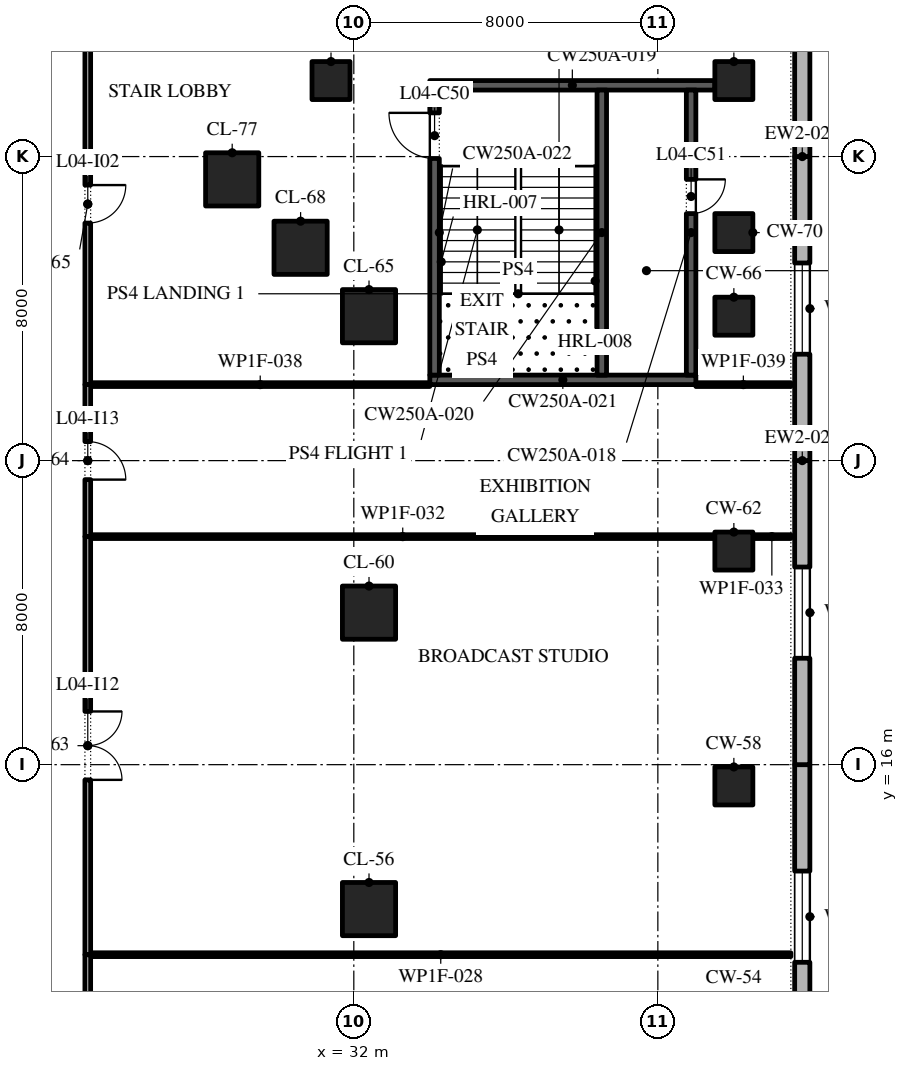
"""IFC4 building model, lengths in metres.
Left out: names, types, materials, properties, quantities, classifications, styles, units other than length and angle.
Written with IfcOpenShell. Run it as: python <this file> out.ifc"""

import sys

from ifc_helpers import new_model, si_unit, direction, frame, frame_2d, origin, origin_2d, place, context, subcontext, project, spatial, polyline, rectangle, outline, extrude, element, fill, save


model = new_model("IFC4")
c1 = context("Model", 3, precision=1e-05, world=origin(), true_north=direction((0.0, 1.0)))
c2 = subcontext(c1, "Body", "Model", "MODEL_VIEW")
j1 = project(units=[si_unit("LENGTHUNIT", "METRE"), si_unit("PLANEANGLEUNIT", "RADIAN")], contexts=[c1])
p1 = place(None, origin())
s1 = spatial("IfcSite", under=j1, at=p1, CompositionType="ELEMENT")
p2 = place(p1, origin())
s2 = spatial("IfcBuilding", under=s1, at=p2, CompositionType="ELEMENT")
p3 = place(p2, frame((0.0, 0.0, 24.0)))
s3 = spatial("IfcBuildingStorey", under=s2, at=p3, CompositionType="ELEMENT", Elevation=24.0)
p4 = place(p3, frame((32.4, 12.2, 0.0), z_axis=(0.0, 0.0, 1.0), x_axis=(1.0, 0.0, 0.0)))
e1 = element("IfcColumn", 1, at=p4, inside=s3, PredefinedType="COLUMN", context=c2, shape_type="SweptSolid", body=[
    extrude(rectangle(XDim=1.4, YDim=1.4, at=origin_2d()), origin(), (0.0, 0.0, 1.0), 4.8),
])
p5 = place(p3, frame((42.0, 15.44, 0.0), z_axis=(0.0, 0.0, 1.0), x_axis=(1.0, 0.0, 0.0)))
e2 = element("IfcColumn", 2, at=p5, inside=s3, PredefinedType="COLUMN", context=c2, shape_type="SweptSolid", body=[
    extrude(rectangle(XDim=1.0, YDim=1.0, at=origin_2d()), origin(), (0.0, 0.0, 1.0), 4.8),
])
p6 = place(p3, frame((32.4, 20.0, 0.0), z_axis=(0.0, 0.0, 1.0), x_axis=(1.0, 0.0, 0.0)))
e3 = element("IfcColumn", 3, at=p6, inside=s3, PredefinedType="COLUMN", context=c2, shape_type="SweptSolid", body=[
    extrude(rectangle(XDim=1.4, YDim=1.4, at=origin_2d()), origin(), (0.0, 0.0, 1.0), 4.8),
])
p7 = place(p3, frame((42.0, 21.62, 0.0), z_axis=(0.0, 0.0, 1.0), x_axis=(1.0, 0.0, 0.0)))
e4 = element("IfcColumn", 4, at=p7, inside=s3, PredefinedType="COLUMN", context=c2, shape_type="SweptSolid", body=[
    extrude(rectangle(XDim=1.0, YDim=1.0, at=origin_2d()), origin(), (0.0, 0.0, 1.0), 4.8),
])
p8 = place(p3, frame((32.4, 27.8, 0.0), z_axis=(0.0, 0.0, 1.0), x_axis=(1.0, 0.0, 0.0)))
e5 = element("IfcColumn", 5, at=p8, inside=s3, PredefinedType="COLUMN", context=c2, shape_type="SweptSolid", body=[
    extrude(rectangle(XDim=1.4, YDim=1.4, at=origin_2d()), origin(), (0.0, 0.0, 1.0), 4.8),
])
p9 = place(p3, frame((42.0, 27.8, 0.0), z_axis=(0.0, 0.0, 1.0), x_axis=(1.0, 0.0, 0.0)))
e6 = element("IfcColumn", 6, at=p9, inside=s3, PredefinedType="COLUMN", context=c2, shape_type="SweptSolid", body=[
    extrude(rectangle(XDim=1.0, YDim=1.0, at=origin_2d()), origin(), (0.0, 0.0, 1.0), 4.8),
])
p10 = place(p3, frame((30.6, 29.6, 0.0), z_axis=(0.0, 0.0, 1.0), x_axis=(1.0, 0.0, 0.0)))
e7 = element("IfcColumn", 7, at=p10, inside=s3, PredefinedType="COLUMN", context=c2, shape_type="SweptSolid", body=[
    extrude(rectangle(XDim=1.4, YDim=1.4, at=origin_2d()), origin(), (0.0, 0.0, 1.0), 4.8),
])
p11 = place(p3, frame((42.0, 30.0, 0.0), z_axis=(0.0, 0.0, 1.0), x_axis=(1.0, 0.0, 0.0)))
e8 = element("IfcColumn", 8, at=p11, inside=s3, PredefinedType="COLUMN", context=c2, shape_type="SweptSolid", body=[
    extrude(rectangle(XDim=1.0, YDim=1.0, at=origin_2d()), origin(), (0.0, 0.0, 1.0), 4.8),
])
p12 = place(p3, frame((28.8, 31.4, 0.0), z_axis=(0.0, 0.0, 1.0), x_axis=(1.0, 0.0, 0.0)))
e9 = element("IfcColumn", 9, at=p12, inside=s3, PredefinedType="COLUMN", context=c2, shape_type="SweptSolid", body=[
    extrude(rectangle(XDim=1.4, YDim=1.4, at=origin_2d()), origin(), (0.0, 0.0, 1.0), 4.8),
])
for number, where, z_axis, x_axis in (
    (10, (31.4, 34.0, 0.0), (0.0, 0.0, 1.0), (1.0, 0.0, 0.0)),
    (11, (42.0, 34.0, 0.0), (0.0, 0.0, 1.0), (1.0, 0.0, 0.0)),
):
    element("IfcColumn", number, at=place(p3, frame(where, z_axis=z_axis, x_axis=x_axis)), inside=s3, PredefinedType="COLUMN", context=c2, shape_type="SweptSolid", body=[
        extrude(rectangle(XDim=1.0, YDim=1.0, at=origin_2d()), origin(), (0.0, 0.0, 1.0), 4.8),
    ])
p13 = place(p3, frame((43.8, 8.0, 0.0), z_axis=(0.0, 0.0, 1.0), x_axis=(0.0, 1.0, 0.0)))
e12 = element("IfcWall", 12, at=p13, inside=s3, PredefinedType="STANDARD", context=c2, shape_type="SweptSolid", body=[
    extrude(rectangle(XDim=8.0, YDim=0.4, at=frame_2d((4.0, 0.0))), origin(), (0.0, 0.0, 1.0), 4.5),
])
p14 = place(p13, frame((2.8, 0.0, 0.9)))
e13 = element("IfcOpeningElement", 13, at=p14, cuts=e12, PredefinedType="OPENING", context=c2, shape_type="SweptSolid", body=[
    extrude(outline(polyline([(0.0, 0.0), (2.4, 0.0), (2.4, 1.5), (2.378, 1.758), (2.313, 2.009), (2.207, 2.245), (2.063, 2.46), (1.885, 2.648), (1.677, 2.804), (1.447, 2.922), (1.2, 3.0), (0.953, 2.922), (0.722, 2.804), (0.515, 2.648), (0.337, 2.46), (0.193, 2.245), (0.087, 2.009), (0.022, 1.758), (0.0, 1.5), (0.0, 0.0)])), frame((0.0, 0.21, 0.0), z_axis=(0.0, -1.0, 0.0), x_axis=(1.0, 0.0, 0.0)), (0.0, 0.0, 1.0), 0.42),
])
p15 = place(p3, frame((43.8, 16.0, 0.0), z_axis=(0.0, 0.0, 1.0), x_axis=(0.0, 1.0, 0.0)))
e14 = element("IfcWall", 14, at=p15, inside=s3, PredefinedType="STANDARD", context=c2, shape_type="SweptSolid", body=[
    extrude(rectangle(XDim=8.0, YDim=0.4, at=frame_2d((4.0, 0.0))), origin(), (0.0, 0.0, 1.0), 4.5),
])
p16 = place(p15, frame((2.8, 0.0, 0.9)))
e15 = element("IfcOpeningElement", 15, at=p16, cuts=e14, PredefinedType="OPENING", context=c2, shape_type="SweptSolid", body=[
    extrude(outline(polyline([(0.0, 0.0), (2.4, 0.0), (2.4, 1.5), (2.378, 1.758), (2.313, 2.009), (2.207, 2.245), (2.063, 2.46), (1.885, 2.648), (1.677, 2.804), (1.447, 2.922), (1.2, 3.0), (0.953, 2.922), (0.722, 2.804), (0.515, 2.648), (0.337, 2.46), (0.193, 2.245), (0.087, 2.009), (0.022, 1.758), (0.0, 1.5), (0.0, 0.0)])), frame((0.0, 0.21, 0.0), z_axis=(0.0, -1.0, 0.0), x_axis=(1.0, 0.0, 0.0)), (0.0, 0.0, 1.0), 0.42),
])
p17 = place(p3, frame((43.8, 24.0, 0.0), z_axis=(0.0, 0.0, 1.0), x_axis=(0.0, 1.0, 0.0)))
e16 = element("IfcWall", 16, at=p17, inside=s3, PredefinedType="STANDARD", context=c2, shape_type="SweptSolid", body=[
    extrude(rectangle(XDim=8.0, YDim=0.4, at=frame_2d((4.0, 0.0))), origin(), (0.0, 0.0, 1.0), 4.5),
])
p18 = place(p17, frame((2.8, 0.0, 0.9)))
e17 = element("IfcOpeningElement", 17, at=p18, cuts=e16, PredefinedType="OPENING", context=c2, shape_type="SweptSolid", body=[
    extrude(outline(polyline([(0.0, 0.0), (2.4, 0.0), (2.4, 1.5), (2.378, 1.758), (2.313, 2.009), (2.207, 2.245), (2.063, 2.46), (1.885, 2.648), (1.677, 2.804), (1.447, 2.922), (1.2, 3.0), (0.953, 2.922), (0.722, 2.804), (0.515, 2.648), (0.337, 2.46), (0.193, 2.245), (0.087, 2.009), (0.022, 1.758), (0.0, 1.5), (0.0, 0.0)])), frame((0.0, 0.21, 0.0), z_axis=(0.0, -1.0, 0.0), x_axis=(1.0, 0.0, 0.0)), (0.0, 0.0, 1.0), 0.42),
])
p19 = place(p3, frame((43.8, 32.0, 0.0), z_axis=(0.0, 0.0, 1.0), x_axis=(0.0, 1.0, 0.0)))
e18 = element("IfcWall", 18, at=p19, inside=s3, PredefinedType="STANDARD", context=c2, shape_type="SweptSolid", body=[
    extrude(rectangle(XDim=4.0, YDim=0.4, at=frame_2d((2.0, 0.0))), origin(), (0.0, 0.0, 1.0), 4.5),
])
p20 = place(p3, frame((34.0, 26.125, 0.0), z_axis=(0.0, 0.0, 1.0), x_axis=(1.0, 0.0, 0.0)))
e19 = element("IfcWall", 19, at=p20, inside=s3, PredefinedType="SHEAR", context=c2, shape_type="SweptSolid", body=[
    extrude(rectangle(XDim=7.0, YDim=0.25, at=frame_2d((3.5, 0.0))), origin(), (0.0, 0.0, 1.0), 4.5),
])
p21 = place(p3, frame((34.0, 33.875, 0.0), z_axis=(0.0, 0.0, 1.0), x_axis=(1.0, 0.0, 0.0)))
e20 = element("IfcWall", 20, at=p21, inside=s3, PredefinedType="SHEAR", context=c2, shape_type="SweptSolid", body=[
    extrude(rectangle(XDim=7.5, YDim=0.25, at=frame_2d((3.75, 0.0))), origin(), (0.0, 0.0, 1.0), 4.5),
])
p22 = place(p3, frame((34.125, 26.25, 0.0), z_axis=(0.0, 0.0, 1.0), x_axis=(0.0, 1.0, 0.0)))
e21 = element("IfcWall", 21, at=p22, inside=s3, PredefinedType="SHEAR", context=c2, shape_type="SweptSolid", body=[
    extrude(rectangle(XDim=7.5, YDim=0.25, at=frame_2d((3.75, 0.0))), origin(), (0.0, 0.0, 1.0), 4.5),
])
p23 = place(p22, frame((5.7, 0.0, 0.0)))
e22 = element("IfcOpeningElement", 22, at=p23, cuts=e21, PredefinedType="OPENING", context=c2, shape_type="SweptSolid", body=[
    extrude(rectangle(XDim=1.2, YDim=2.1, at=frame_2d((0.6, 1.05))), frame((0.0, 0.135, 0.0), z_axis=(0.0, -1.0, 0.0), x_axis=(1.0, 0.0, 0.0)), (0.0, 0.0, 1.0), 0.27),
])
p24 = place(p3, frame((40.875, 26.25, 0.0), z_axis=(0.0, 0.0, 1.0), x_axis=(0.0, 1.0, 0.0)))
e23 = element("IfcWall", 23, at=p24, inside=s3, PredefinedType="SHEAR", context=c2, shape_type="SweptSolid", body=[
    extrude(rectangle(XDim=7.5, YDim=0.25, at=frame_2d((3.75, 0.0))), origin(), (0.0, 0.0, 1.0), 4.5),
])
p25 = place(p24, frame((4.25, 0.0, 0.0)))
e24 = element("IfcOpeningElement", 24, at=p25, cuts=e23, PredefinedType="OPENING", context=c2, shape_type="SweptSolid", body=[
    extrude(rectangle(XDim=0.9, YDim=2.1, at=frame_2d((0.45, 1.05))), frame((0.0, 0.135, 0.0), z_axis=(0.0, -1.0, 0.0), x_axis=(1.0, 0.0, 0.0)), (0.0, 0.0, 1.0), 0.27),
])
p26 = place(p3, frame((38.525, 26.25, 0.0), z_axis=(0.0, 0.0, 1.0), x_axis=(0.0, 1.0, 0.0)))
e25 = element("IfcWall", 25, at=p26, inside=s3, PredefinedType="SHEAR", context=c2, shape_type="SweptSolid", body=[
    extrude(rectangle(XDim=7.5, YDim=0.25, at=frame_2d((3.75, 0.0))), origin(), (0.0, 0.0, 1.0), 4.5),
])
p27 = place(p3, frame((25.075, 11.0, 0.0), z_axis=(0.0, 0.0, 1.0), x_axis=(1.0, 0.0, 0.0)))
e26 = element("IfcWall", 26, at=p27, inside=s3, PredefinedType="PARTITIONING", context=c2, shape_type="SweptSolid", body=[
    extrude(rectangle(XDim=18.425, YDim=0.1, at=frame_2d((9.212, 0.0))), origin(), (0.0, 0.0, 1.0), 4.5),
])
p28 = place(p3, frame((25.075, 22.0, 0.0), z_axis=(0.0, 0.0, 1.0), x_axis=(1.0, 0.0, 0.0)))
e27 = element("IfcWall", 27, at=p28, inside=s3, PredefinedType="PARTITIONING", context=c2, shape_type="SweptSolid", body=[
    extrude(rectangle(XDim=16.425, YDim=0.1, at=frame_2d((8.212, 0.0))), origin(), (0.0, 0.0, 1.0), 4.5),
])
p29 = place(p3, frame((42.5, 22.0, 0.0), z_axis=(0.0, 0.0, 1.0), x_axis=(1.0, 0.0, 0.0)))
e28 = element("IfcWall", 28, at=p29, inside=s3, PredefinedType="PARTITIONING", context=c2, shape_type="SweptSolid", body=[
    extrude(rectangle(XDim=1.0, YDim=0.1, at=frame_2d((0.5, 0.0))), origin(), (0.0, 0.0, 1.0), 4.5),
])
p30 = place(p3, frame((25.075, 26.0, 0.0), z_axis=(0.0, 0.0, 1.0), x_axis=(1.0, 0.0, 0.0)))
e29 = element("IfcWall", 29, at=p30, inside=s3, PredefinedType="PARTITIONING", context=c2, shape_type="SweptSolid", body=[
    extrude(rectangle(XDim=8.925, YDim=0.1, at=frame_2d((4.462, 0.0))), origin(), (0.0, 0.0, 1.0), 4.5),
])
p31 = place(p3, frame((41.0, 26.0, 0.0), z_axis=(0.0, 0.0, 1.0), x_axis=(1.0, 0.0, 0.0)))
e30 = element("IfcWall", 30, at=p31, inside=s3, PredefinedType="PARTITIONING", context=c2, shape_type="SweptSolid", body=[
    extrude(rectangle(XDim=2.5, YDim=0.1, at=frame_2d((1.25, 0.0))), origin(), (0.0, 0.0, 1.0), 4.5),
])
p32 = place(p3, frame((25.0, 0.5, 0.0), z_axis=(0.0, 0.0, 1.0), x_axis=(0.0, 1.0, 0.0)))
e31 = element("IfcWall", 31, at=p32, inside=s3, PredefinedType="PARTITIONING", context=c2, shape_type="SweptSolid", body=[
    extrude(rectangle(XDim=10.5, YDim=0.15, at=frame_2d((5.25, 0.0))), origin(), (0.0, 0.0, 1.0), 4.5),
])
p33 = place(p32, frame((4.35, 0.0, 0.0)))
e32 = element("IfcOpeningElement", 32, at=p33, cuts=e31, PredefinedType="OPENING", context=c2, shape_type="SweptSolid", body=[
    extrude(rectangle(XDim=1.8, YDim=2.1, at=frame_2d((0.9, 1.05))), frame((0.0, 0.085, 0.0), z_axis=(0.0, -1.0, 0.0), x_axis=(1.0, 0.0, 0.0)), (0.0, 0.0, 1.0), 0.17),
])
p34 = place(p3, frame((25.0, 11.0, 0.0), z_axis=(0.0, 0.0, 1.0), x_axis=(0.0, 1.0, 0.0)))
e33 = element("IfcWall", 33, at=p34, inside=s3, PredefinedType="PARTITIONING", context=c2, shape_type="SweptSolid", body=[
    extrude(rectangle(XDim=11.0, YDim=0.15, at=frame_2d((5.5, 0.0))), origin(), (0.0, 0.0, 1.0), 4.5),
])
p35 = place(p34, frame((4.6, 0.0, 0.0)))
e34 = element("IfcOpeningElement", 34, at=p35, cuts=e33, PredefinedType="OPENING", context=c2, shape_type="SweptSolid", body=[
    extrude(rectangle(XDim=1.8, YDim=2.1, at=frame_2d((0.9, 1.05))), frame((0.0, 0.085, 0.0), z_axis=(0.0, -1.0, 0.0), x_axis=(1.0, 0.0, 0.0)), (0.0, 0.0, 1.0), 0.17),
])
p36 = place(p3, frame((25.0, 22.0, 0.0), z_axis=(0.0, 0.0, 1.0), x_axis=(0.0, 1.0, 0.0)))
e35 = element("IfcWall", 35, at=p36, inside=s3, PredefinedType="PARTITIONING", context=c2, shape_type="SweptSolid", body=[
    extrude(rectangle(XDim=4.0, YDim=0.15, at=frame_2d((2.0, 0.0))), origin(), (0.0, 0.0, 1.0), 4.5),
])
p37 = place(p36, frame((1.5, 0.0, 0.0)))
e36 = element("IfcOpeningElement", 36, at=p37, cuts=e35, PredefinedType="OPENING", context=c2, shape_type="SweptSolid", body=[
    extrude(rectangle(XDim=1.0, YDim=2.1, at=frame_2d((0.5, 1.05))), frame((0.0, 0.085, 0.0), z_axis=(0.0, -1.0, 0.0), x_axis=(1.0, 0.0, 0.0)), (0.0, 0.0, 1.0), 0.17),
])
p38 = place(p3, frame((25.0, 26.0, 0.0), z_axis=(0.0, 0.0, 1.0), x_axis=(0.0, 1.0, 0.0)))
e37 = element("IfcWall", 37, at=p38, inside=s3, PredefinedType="PARTITIONING", context=c2, shape_type="SweptSolid", body=[
    extrude(rectangle(XDim=9.5, YDim=0.15, at=frame_2d((4.75, 0.0))), origin(), (0.0, 0.0, 1.0), 4.5),
])
p39 = place(p38, frame((4.25, 0.0, 0.0)))
e38 = element("IfcOpeningElement", 38, at=p39, cuts=e37, PredefinedType="OPENING", context=c2, shape_type="SweptSolid", body=[
    extrude(rectangle(XDim=1.0, YDim=2.1, at=frame_2d((0.5, 1.05))), frame((0.0, 0.085, 0.0), z_axis=(0.0, -1.0, 0.0), x_axis=(1.0, 0.0, 0.0)), (0.0, 0.0, 1.0), 0.17),
])
p40 = place(p14, origin())
e39 = element("IfcWindow", 39, at=p40, inside=s3, PartitioningType="DOUBLE_PANEL_VERTICAL", PredefinedType="WINDOW", context=c2, shape_type="SweptSolid", body=[
    extrude(outline(polyline([(0.0, 0.0), (2.4, 0.0), (2.4, 1.5), (2.378, 1.758), (2.313, 2.009), (2.207, 2.245), (2.063, 2.46), (1.885, 2.648), (1.677, 2.804), (1.447, 2.922), (1.2, 3.0), (0.953, 2.922), (0.722, 2.804), (0.515, 2.648), (0.337, 2.46), (0.193, 2.245), (0.087, 2.009), (0.022, 1.758), (0.0, 1.5), (0.0, 0.0)])), frame((0.0, 0.03, 0.0), z_axis=(0.0, -1.0, 0.0), x_axis=(1.0, 0.0, 0.0)), (0.0, 0.0, 1.0), 0.06),
])
fill(e13, e39)
p41 = place(p16, origin())
e40 = element("IfcWindow", 40, at=p41, inside=s3, PartitioningType="DOUBLE_PANEL_VERTICAL", PredefinedType="WINDOW", context=c2, shape_type="SweptSolid", body=[
    extrude(outline(polyline([(0.0, 0.0), (2.4, 0.0), (2.4, 1.5), (2.378, 1.758), (2.313, 2.009), (2.207, 2.245), (2.063, 2.46), (1.885, 2.648), (1.677, 2.804), (1.447, 2.922), (1.2, 3.0), (0.953, 2.922), (0.722, 2.804), (0.515, 2.648), (0.337, 2.46), (0.193, 2.245), (0.087, 2.009), (0.022, 1.758), (0.0, 1.5), (0.0, 0.0)])), frame((0.0, 0.03, 0.0), z_axis=(0.0, -1.0, 0.0), x_axis=(1.0, 0.0, 0.0)), (0.0, 0.0, 1.0), 0.06),
])
fill(e15, e40)
p42 = place(p18, origin())
e41 = element("IfcWindow", 41, at=p42, inside=s3, PartitioningType="DOUBLE_PANEL_VERTICAL", PredefinedType="WINDOW", context=c2, shape_type="SweptSolid", body=[
    extrude(outline(polyline([(0.0, 0.0), (2.4, 0.0), (2.4, 1.5), (2.378, 1.758), (2.313, 2.009), (2.207, 2.245), (2.063, 2.46), (1.885, 2.648), (1.677, 2.804), (1.447, 2.922), (1.2, 3.0), (0.953, 2.922), (0.722, 2.804), (0.515, 2.648), (0.337, 2.46), (0.193, 2.245), (0.087, 2.009), (0.022, 1.758), (0.0, 1.5), (0.0, 0.0)])), frame((0.0, 0.03, 0.0), z_axis=(0.0, -1.0, 0.0), x_axis=(1.0, 0.0, 0.0)), (0.0, 0.0, 1.0), 0.06),
])
fill(e17, e41)
p43 = place(p23, origin())
e42 = element("IfcDoor", 42, at=p43, inside=s3, OperationType="SINGLE_SWING_LEFT", PredefinedType="DOOR", context=c2, shape_type="SweptSolid", body=[
    extrude(rectangle(XDim=1.2, YDim=2.1, at=frame_2d((0.6, 1.05))), frame((0.0, 0.025, 0.0), z_axis=(0.0, -1.0, 0.0), x_axis=(1.0, 0.0, 0.0)), (0.0, 0.0, 1.0), 0.05),
])
fill(e22, e42)
p44 = place(p25, frame((0.9, 0.2, 0.0), z_axis=(0.0, 0.0, 1.0), x_axis=(-1.0, 0.0, 0.0)))
e43 = element("IfcDoor", 43, at=p44, inside=s3, OperationType="SINGLE_SWING_RIGHT", PredefinedType="DOOR", context=c2, shape_type="SweptSolid", body=[
    extrude(rectangle(XDim=0.9, YDim=2.1, at=frame_2d((0.45, 1.05))), frame((0.0, 0.125, 0.0), z_axis=(0.0, -1.0, 0.0), x_axis=(1.0, 0.0, 0.0)), (0.0, 0.0, 1.0), 0.05),
])
fill(e24, e43)
p45 = place(p39, frame((1.0, 0.0, 0.0), z_axis=(0.0, 0.0, 1.0), x_axis=(-1.0, 0.0, 0.0)))
e44 = element("IfcDoor", 44, at=p45, inside=s3, OperationType="SINGLE_SWING_RIGHT", PredefinedType="DOOR", context=c2, shape_type="SweptSolid", body=[
    extrude(rectangle(XDim=1.0, YDim=2.1, at=frame_2d((0.5, 1.05))), frame((0.0, 0.025, 0.0), z_axis=(0.0, -1.0, 0.0), x_axis=(1.0, 0.0, 0.0)), (0.0, 0.0, 1.0), 0.05),
])
fill(e38, e44)
p46 = place(p35, frame((1.8, 0.0, 0.0), z_axis=(0.0, 0.0, 1.0), x_axis=(-1.0, 0.0, 0.0)))
e45 = element("IfcDoor", 45, at=p46, inside=s3, OperationType="SINGLE_SWING_LEFT", PredefinedType="DOOR", context=c2, shape_type="SweptSolid", body=[
    extrude(rectangle(XDim=1.8, YDim=2.1, at=frame_2d((0.9, 1.05))), frame((0.0, 0.025, 0.0), z_axis=(0.0, -1.0, 0.0), x_axis=(1.0, 0.0, 0.0)), (0.0, 0.0, 1.0), 0.05),
])
fill(e34, e45)
p47 = place(p37, frame((1.0, 0.0, 0.0), z_axis=(0.0, 0.0, 1.0), x_axis=(-1.0, 0.0, 0.0)))
e46 = element("IfcDoor", 46, at=p47, inside=s3, OperationType="SINGLE_SWING_LEFT", PredefinedType="DOOR", context=c2, shape_type="SweptSolid", body=[
    extrude(rectangle(XDim=1.0, YDim=2.1, at=frame_2d((0.5, 1.05))), frame((0.0, 0.025, 0.0), z_axis=(0.0, -1.0, 0.0), x_axis=(1.0, 0.0, 0.0)), (0.0, 0.0, 1.0), 0.05),
])
fill(e36, e46)
save(model, sys.argv[1])
